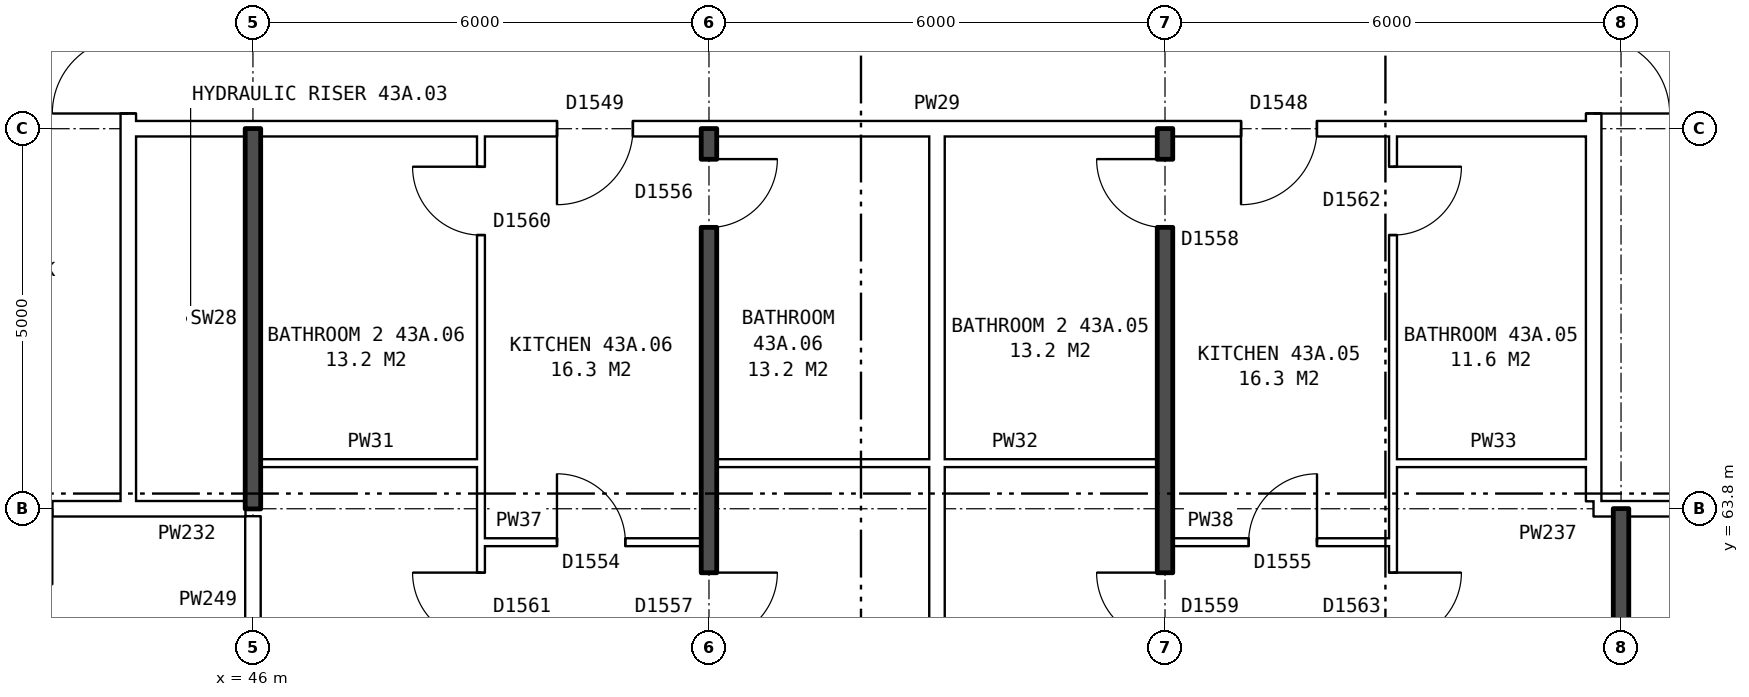
"""IFC4 building model, lengths in metres.
Left out: names, types, materials, properties, quantities, classifications, styles, units other than length and angle.
Written with IfcOpenShell. Run it as: python <this file> out.ifc"""

import sys

from ifc_helpers import new_model, si_unit, direction, frame, frame_2d, origin, place, context, subcontext, project, spatial, rectangle, extrude, element, fill, save


model = new_model("IFC4")
c1 = context("Model", 3, precision=1e-05, world=origin(), true_north=direction((0.0, 1.0)))
c2 = subcontext(c1, "Body", "Model", "MODEL_VIEW")
j1 = project(units=[si_unit("LENGTHUNIT", "METRE"), si_unit("PLANEANGLEUNIT", "RADIAN")], contexts=[c1])
p1 = place(None, origin())
s1 = spatial("IfcSite", under=j1, at=p1, CompositionType="ELEMENT")
p2 = place(p1, origin())
s2 = spatial("IfcBuilding", under=s1, at=p2, CompositionType="ELEMENT")
p3 = place(p2, frame((0.0, 0.0, 154.7)))
s3 = spatial("IfcBuildingStorey", under=s2, at=p3, CompositionType="ELEMENT", Elevation=154.7)
p4 = place(p3, frame((63.64, 63.9, 0.0), z_axis=(0.0, 0.0, 1.0), x_axis=(0.0, 1.0, 0.0)))
e1 = element("IfcWall", 1, at=p4, inside=s3, PredefinedType="PARTITIONING", context=c2, shape_type="SweptSolid", body=[
    extrude(rectangle(XDim=12.2, YDim=0.2, at=frame_2d((6.1, 0.0))), origin(), (0.0, 0.0, 1.0), 2.85),
])
p5 = place(p4, frame((5.1, 0.0, 0.0)))
e2 = element("IfcOpeningElement", 2, at=p5, cuts=e1, PredefinedType="OPENING", context=c2, shape_type="SweptSolid", body=[
    extrude(rectangle(XDim=2.0, YDim=2.1, at=frame_2d((1.0, 1.05))), frame((0.0, 0.11, 0.0), z_axis=(0.0, -1.0, 0.0), x_axis=(1.0, 0.0, 0.0)), (0.0, 0.0, 1.0), 0.22),
])
p6 = place(p3, frame((44.36, 63.9, 0.0), z_axis=(0.0, 0.0, 1.0), x_axis=(0.0, 1.0, 0.0)))
e3 = element("IfcWall", 3, at=p6, inside=s3, PredefinedType="PARTITIONING", context=c2, shape_type="SweptSolid", body=[
    extrude(rectangle(XDim=12.2, YDim=0.2, at=frame_2d((6.1, 0.0))), origin(), (0.0, 0.0, 1.0), 2.85),
])
p7 = place(p6, frame((5.1, 0.0, 0.0)))
e4 = element("IfcOpeningElement", 4, at=p7, cuts=e3, PredefinedType="OPENING", context=c2, shape_type="SweptSolid", body=[
    extrude(rectangle(XDim=2.0, YDim=2.1, at=frame_2d((1.0, 1.05))), frame((0.0, 0.11, 0.0), z_axis=(0.0, -1.0, 0.0), x_axis=(1.0, 0.0, 0.0)), (0.0, 0.0, 1.0), 0.22),
])
p8 = place(p3, frame((49.0, 63.36, 0.0), z_axis=(0.0, 0.0, 1.0), x_axis=(1.0, 0.0, 0.0)))
e5 = element("IfcWall", 5, at=p8, inside=s3, PredefinedType="PARTITIONING", context=c2, shape_type="SweptSolid", body=[
    extrude(rectangle(XDim=2.9, YDim=0.1, at=frame_2d((1.45, 0.0))), origin(), (0.0, 0.0, 1.0), 2.85),
])
p9 = place(p8, frame((1.0, 0.0, 0.0)))
e6 = element("IfcOpeningElement", 6, at=p9, cuts=e5, PredefinedType="OPENING", context=c2, shape_type="SweptSolid", body=[
    extrude(rectangle(XDim=0.9, YDim=2.1, at=frame_2d((0.45, 1.05))), frame((0.0, 0.06, 0.0), z_axis=(0.0, -1.0, 0.0), x_axis=(1.0, 0.0, 0.0)), (0.0, 0.0, 1.0), 0.12),
])
p10 = place(p3, frame((58.1, 63.36, 0.0), z_axis=(0.0, 0.0, 1.0), x_axis=(1.0, 0.0, 0.0)))
e7 = element("IfcWall", 7, at=p10, inside=s3, PredefinedType="PARTITIONING", context=c2, shape_type="SweptSolid", body=[
    extrude(rectangle(XDim=2.9, YDim=0.1, at=frame_2d((1.45, 0.0))), origin(), (0.0, 0.0, 1.0), 2.85),
])
p11 = place(p10, frame((1.0, 0.0, 0.0)))
e8 = element("IfcOpeningElement", 8, at=p11, cuts=e7, PredefinedType="OPENING", context=c2, shape_type="SweptSolid", body=[
    extrude(rectangle(XDim=0.9, YDim=2.1, at=frame_2d((0.45, 1.05))), frame((0.0, 0.06, 0.0), z_axis=(0.0, -1.0, 0.0), x_axis=(1.0, 0.0, 0.0)), (0.0, 0.0, 1.0), 0.12),
])
p12 = place(p3, frame((41.36, 63.8, 0.0), z_axis=(0.0, 0.0, 1.0), x_axis=(1.0, 0.0, 0.0)))
e9 = element("IfcWall", 9, at=p12, inside=s3, PredefinedType="PARTITIONING", context=c2, shape_type="SweptSolid", body=[
    extrude(rectangle(XDim=3.0, YDim=0.2, at=frame_2d((1.5, 0.0))), origin(), (0.0, 0.0, 1.0), 2.85),
])
p13 = place(p12, frame((1.0, 0.0, 0.0)))
e10 = element("IfcOpeningElement", 10, at=p13, cuts=e9, PredefinedType="OPENING", context=c2, shape_type="SweptSolid", body=[
    extrude(rectangle(XDim=1.0, YDim=2.1, at=frame_2d((0.5, 1.05))), frame((0.0, 0.11, 0.0), z_axis=(0.0, -1.0, 0.0), x_axis=(1.0, 0.0, 0.0)), (0.0, 0.0, 1.0), 0.22),
])
p14 = place(p3, frame((44.36, 63.8, 0.0), z_axis=(0.0, 0.0, 1.0), x_axis=(1.0, 0.0, 0.0)))
e11 = element("IfcWall", 11, at=p14, inside=s3, PredefinedType="PARTITIONING", context=c2, shape_type="SweptSolid", body=[
    extrude(rectangle(XDim=1.54, YDim=0.2, at=frame_2d((0.77, 0.0))), origin(), (0.0, 0.0, 1.0), 2.85),
])
p15 = place(p3, frame((63.64, 63.8, 0.0), z_axis=(0.0, 0.0, 1.0), x_axis=(1.0, 0.0, 0.0)))
e12 = element("IfcWall", 12, at=p15, inside=s3, PredefinedType="PARTITIONING", context=c2, shape_type="SweptSolid", body=[
    extrude(rectangle(XDim=3.0, YDim=0.2, at=frame_2d((1.5, 0.0))), origin(), (0.0, 0.0, 1.0), 2.85),
])
p16 = place(p15, frame((1.18, 0.0, 0.0)))
e13 = element("IfcOpeningElement", 13, at=p16, cuts=e12, PredefinedType="OPENING", context=c2, shape_type="SweptSolid", body=[
    extrude(rectangle(XDim=1.0, YDim=2.1, at=frame_2d((0.5, 1.05))), frame((0.0, 0.11, 0.0), z_axis=(0.0, -1.0, 0.0), x_axis=(1.0, 0.0, 0.0)), (0.0, 0.0, 1.0), 0.22),
])
p17 = place(p3, frame((46.1, 64.4, 0.0), z_axis=(0.0, 0.0, 1.0), x_axis=(1.0, 0.0, 0.0)))
e14 = element("IfcWall", 14, at=p17, inside=s3, PredefinedType="PARTITIONING", context=c2, shape_type="SweptSolid", body=[
    extrude(rectangle(XDim=2.9, YDim=0.1, at=frame_2d((1.45, 0.0))), origin(), (0.0, 0.0, 1.0), 2.85),
])
p18 = place(p3, frame((52.1, 64.4, 0.0), z_axis=(0.0, 0.0, 1.0), x_axis=(1.0, 0.0, 0.0)))
e15 = element("IfcWall", 15, at=p18, inside=s3, PredefinedType="PARTITIONING", context=c2, shape_type="SweptSolid", body=[
    extrude(rectangle(XDim=5.8, YDim=0.1, at=frame_2d((2.9, 0.0))), origin(), (0.0, 0.0, 1.0), 2.85),
])
p19 = place(p3, frame((61.0, 64.4, 0.0), z_axis=(0.0, 0.0, 1.0), x_axis=(1.0, 0.0, 0.0)))
e16 = element("IfcWall", 16, at=p19, inside=s3, PredefinedType="PARTITIONING", context=c2, shape_type="SweptSolid", body=[
    extrude(rectangle(XDim=2.64, YDim=0.1, at=frame_2d((1.32, 0.0))), origin(), (0.0, 0.0, 1.0), 2.85),
])
p20 = place(p3, frame((44.36, 68.8, 0.0), z_axis=(0.0, 0.0, 1.0), x_axis=(1.0, 0.0, 0.0)))
e17 = element("IfcWall", 17, at=p20, inside=s3, PredefinedType="PARTITIONING", context=c2, shape_type="SweptSolid", body=[
    extrude(rectangle(XDim=19.28, YDim=0.2, at=frame_2d((9.64, 0.0))), origin(), (0.0, 0.0, 1.0), 2.85),
])
p21 = place(p20, frame((14.64, 0.0, 0.0)))
e18 = element("IfcOpeningElement", 18, at=p21, cuts=e17, PredefinedType="OPENING", context=c2, shape_type="SweptSolid", body=[
    extrude(rectangle(XDim=1.0, YDim=2.1, at=frame_2d((0.5, 1.05))), frame((0.0, 0.11, 0.0), z_axis=(0.0, -1.0, 0.0), x_axis=(1.0, 0.0, 0.0)), (0.0, 0.0, 1.0), 0.22),
])
p22 = place(p20, frame((5.64, 0.0, 0.0)))
e19 = element("IfcOpeningElement", 19, at=p22, cuts=e17, PredefinedType="OPENING", context=c2, shape_type="SweptSolid", body=[
    extrude(rectangle(XDim=1.0, YDim=2.1, at=frame_2d((0.5, 1.05))), frame((0.0, 0.11, 0.0), z_axis=(0.0, -1.0, 0.0), x_axis=(1.0, 0.0, 0.0)), (0.0, 0.0, 1.0), 0.22),
])
p23 = place(p3, frame((46.0, 61.5, 0.0), z_axis=(0.0, 0.0, 1.0), x_axis=(0.0, 1.0, 0.0)))
e20 = element("IfcWall", 20, at=p23, inside=s3, PredefinedType="PARTITIONING", context=c2, shape_type="SweptSolid", body=[
    extrude(rectangle(XDim=2.2, YDim=0.2, at=frame_2d((1.1, 0.0))), origin(), (0.0, 0.0, 1.0), 2.85),
])
p24 = place(p3, frame((46.0, 63.8, 0.0), z_axis=(0.0, 0.0, 1.0), x_axis=(0.0, 1.0, 0.0)))
e21 = element("IfcWall", 21, at=p24, inside=s3, PredefinedType="SOLIDWALL", context=c2, shape_type="SweptSolid", body=[
    extrude(rectangle(XDim=5.0, YDim=0.2, at=frame_2d((2.5, 0.0))), origin(), (0.0, 0.0, 1.0), 2.85),
])
p25 = place(p3, frame((49.0, 54.36, 0.0), z_axis=(0.0, 0.0, 1.0), x_axis=(0.0, 1.0, 0.0)))
e22 = element("IfcWall", 22, at=p25, inside=s3, PredefinedType="PARTITIONING", context=c2, shape_type="SweptSolid", body=[
    extrude(rectangle(XDim=14.34, YDim=0.1, at=frame_2d((7.17, 0.0))), origin(), (0.0, 0.0, 1.0), 2.85),
])
p26 = place(p25, frame((7.7, 0.0, 0.0)))
e23 = element("IfcOpeningElement", 23, at=p26, cuts=e22, PredefinedType="OPENING", context=c2, shape_type="SweptSolid", body=[
    extrude(rectangle(XDim=0.9, YDim=2.1, at=frame_2d((0.45, 1.05))), frame((0.0, 0.06, 0.0), z_axis=(0.0, -1.0, 0.0), x_axis=(1.0, 0.0, 0.0)), (0.0, 0.0, 1.0), 0.12),
])
p27 = place(p25, frame((13.04, 0.0, 0.0)))
e24 = element("IfcOpeningElement", 24, at=p27, cuts=e22, PredefinedType="OPENING", context=c2, shape_type="SweptSolid", body=[
    extrude(rectangle(XDim=0.9, YDim=2.1, at=frame_2d((0.45, 1.05))), frame((0.0, 0.06, 0.0), z_axis=(0.0, -1.0, 0.0), x_axis=(1.0, 0.0, 0.0)), (0.0, 0.0, 1.0), 0.12),
])
p28 = place(p3, frame((52.0, 54.36, 0.0), z_axis=(0.0, 0.0, 1.0), x_axis=(0.0, 1.0, 0.0)))
e25 = element("IfcWall", 25, at=p28, inside=s3, PredefinedType="SOLIDWALL", context=c2, shape_type="SweptSolid", body=[
    extrude(rectangle(XDim=14.44, YDim=0.2, at=frame_2d((7.22, 0.0))), origin(), (0.0, 0.0, 1.0), 2.85),
])
p29 = place(p28, frame((7.7, 0.0, 0.0)))
e26 = element("IfcOpeningElement", 26, at=p29, cuts=e25, PredefinedType="OPENING", context=c2, shape_type="SweptSolid", body=[
    extrude(rectangle(XDim=0.9, YDim=2.1, at=frame_2d((0.45, 1.05))), frame((0.0, 0.11, 0.0), z_axis=(0.0, -1.0, 0.0), x_axis=(1.0, 0.0, 0.0)), (0.0, 0.0, 1.0), 0.22),
])
p30 = place(p28, frame((13.14, 0.0, 0.0)))
e27 = element("IfcOpeningElement", 27, at=p30, cuts=e25, PredefinedType="OPENING", context=c2, shape_type="SweptSolid", body=[
    extrude(rectangle(XDim=0.9, YDim=2.1, at=frame_2d((0.45, 1.05))), frame((0.0, 0.11, 0.0), z_axis=(0.0, -1.0, 0.0), x_axis=(1.0, 0.0, 0.0)), (0.0, 0.0, 1.0), 0.22),
])
p31 = place(p3, frame((55.0, 54.36, 0.0), z_axis=(0.0, 0.0, 1.0), x_axis=(0.0, 1.0, 0.0)))
e28 = element("IfcWall", 28, at=p31, inside=s3, PredefinedType="PARTITIONING", context=c2, shape_type="SweptSolid", body=[
    extrude(rectangle(XDim=14.34, YDim=0.2, at=frame_2d((7.17, 0.0))), origin(), (0.0, 0.0, 1.0), 2.85),
])
p32 = place(p3, frame((58.0, 54.36, 0.0), z_axis=(0.0, 0.0, 1.0), x_axis=(0.0, 1.0, 0.0)))
e29 = element("IfcWall", 29, at=p32, inside=s3, PredefinedType="SOLIDWALL", context=c2, shape_type="SweptSolid", body=[
    extrude(rectangle(XDim=14.44, YDim=0.2, at=frame_2d((7.22, 0.0))), origin(), (0.0, 0.0, 1.0), 2.85),
])
p33 = place(p32, frame((7.7, 0.0, 0.0)))
e30 = element("IfcOpeningElement", 30, at=p33, cuts=e29, PredefinedType="OPENING", context=c2, shape_type="SweptSolid", body=[
    extrude(rectangle(XDim=0.9, YDim=2.1, at=frame_2d((0.45, 1.05))), frame((0.0, 0.11, 0.0), z_axis=(0.0, -1.0, 0.0), x_axis=(1.0, 0.0, 0.0)), (0.0, 0.0, 1.0), 0.22),
])
p34 = place(p32, frame((13.14, 0.0, 0.0)))
e31 = element("IfcOpeningElement", 31, at=p34, cuts=e29, PredefinedType="OPENING", context=c2, shape_type="SweptSolid", body=[
    extrude(rectangle(XDim=0.9, YDim=2.1, at=frame_2d((0.45, 1.05))), frame((0.0, 0.11, 0.0), z_axis=(0.0, -1.0, 0.0), x_axis=(1.0, 0.0, 0.0)), (0.0, 0.0, 1.0), 0.22),
])
p35 = place(p3, frame((61.0, 54.36, 0.0), z_axis=(0.0, 0.0, 1.0), x_axis=(0.0, 1.0, 0.0)))
e32 = element("IfcWall", 32, at=p35, inside=s3, PredefinedType="PARTITIONING", context=c2, shape_type="SweptSolid", body=[
    extrude(rectangle(XDim=14.34, YDim=0.1, at=frame_2d((7.17, 0.0))), origin(), (0.0, 0.0, 1.0), 2.85),
])
p36 = place(p35, frame((7.7, 0.0, 0.0)))
e33 = element("IfcOpeningElement", 33, at=p36, cuts=e32, PredefinedType="OPENING", context=c2, shape_type="SweptSolid", body=[
    extrude(rectangle(XDim=0.9, YDim=2.1, at=frame_2d((0.45, 1.05))), frame((0.0, 0.06, 0.0), z_axis=(0.0, -1.0, 0.0), x_axis=(1.0, 0.0, 0.0)), (0.0, 0.0, 1.0), 0.12),
])
p37 = place(p35, frame((13.04, 0.0, 0.0)))
e34 = element("IfcOpeningElement", 34, at=p37, cuts=e32, PredefinedType="OPENING", context=c2, shape_type="SweptSolid", body=[
    extrude(rectangle(XDim=0.9, YDim=2.1, at=frame_2d((0.45, 1.05))), frame((0.0, 0.06, 0.0), z_axis=(0.0, -1.0, 0.0), x_axis=(1.0, 0.0, 0.0)), (0.0, 0.0, 1.0), 0.12),
])
p38 = place(p3, frame((64.0, 54.36, 0.0), z_axis=(0.0, 0.0, 1.0), x_axis=(0.0, 1.0, 0.0)))
e35 = element("IfcWall", 35, at=p38, inside=s3, PredefinedType="SOLIDWALL", context=c2, shape_type="SweptSolid", body=[
    extrude(rectangle(XDim=9.44, YDim=0.2, at=frame_2d((4.72, 0.0))), origin(), (0.0, 0.0, 1.0), 2.85),
])
p39 = place(p5, frame((2.0, 0.0, 0.0), z_axis=(0.0, 0.0, 1.0), x_axis=(-1.0, 0.0, 0.0)))
e36 = element("IfcDoor", 36, at=p39, inside=s3, OperationType="DOUBLE_DOOR_SINGLE_SWING", PredefinedType="DOOR", context=c2, shape_type="SweptSolid", body=[
    extrude(rectangle(XDim=2.0, YDim=2.1, at=frame_2d((1.0, 1.05))), frame((0.0, 0.025, 0.0), z_axis=(0.0, -1.0, 0.0), x_axis=(1.0, 0.0, 0.0)), (0.0, 0.0, 1.0), 0.05),
])
fill(e2, e36)
p40 = place(p7, origin())
e37 = element("IfcDoor", 37, at=p40, inside=s3, OperationType="DOUBLE_DOOR_SINGLE_SWING", PredefinedType="DOOR", context=c2, shape_type="SweptSolid", body=[
    extrude(rectangle(XDim=2.0, YDim=2.1, at=frame_2d((1.0, 1.05))), frame((0.0, 0.025, 0.0), z_axis=(0.0, -1.0, 0.0), x_axis=(1.0, 0.0, 0.0)), (0.0, 0.0, 1.0), 0.05),
])
fill(e4, e37)
p41 = place(p36, frame((0.9, 0.0, 0.0), z_axis=(0.0, 0.0, 1.0), x_axis=(-1.0, 0.0, 0.0)))
e38 = element("IfcDoor", 38, at=p41, inside=s3, OperationType="SINGLE_SWING_LEFT", PredefinedType="DOOR", context=c2, shape_type="SweptSolid", body=[
    extrude(rectangle(XDim=0.9, YDim=2.1, at=frame_2d((0.45, 1.05))), frame((0.0, 0.025, 0.0), z_axis=(0.0, -1.0, 0.0), x_axis=(1.0, 0.0, 0.0)), (0.0, 0.0, 1.0), 0.05),
])
fill(e33, e38)
p42 = place(p33, origin())
e39 = element("IfcDoor", 39, at=p42, inside=s3, OperationType="SINGLE_SWING_RIGHT", PredefinedType="DOOR", context=c2, shape_type="SweptSolid", body=[
    extrude(rectangle(XDim=0.9, YDim=2.1, at=frame_2d((0.45, 1.05))), frame((0.0, 0.025, 0.0), z_axis=(0.0, -1.0, 0.0), x_axis=(1.0, 0.0, 0.0)), (0.0, 0.0, 1.0), 0.05),
])
fill(e30, e39)
p43 = place(p21, frame((1.0, 0.0, 0.0), z_axis=(0.0, 0.0, 1.0), x_axis=(-1.0, 0.0, 0.0)))
e40 = element("IfcDoor", 40, at=p43, inside=s3, OperationType="SINGLE_SWING_RIGHT", PredefinedType="DOOR", context=c2, shape_type="SweptSolid", body=[
    extrude(rectangle(XDim=1.0, YDim=2.1, at=frame_2d((0.5, 1.05))), frame((0.0, 0.025, 0.0), z_axis=(0.0, -1.0, 0.0), x_axis=(1.0, 0.0, 0.0)), (0.0, 0.0, 1.0), 0.05),
])
fill(e18, e40)
p44 = place(p11, origin())
e41 = element("IfcDoor", 41, at=p44, inside=s3, OperationType="SINGLE_SWING_RIGHT", PredefinedType="DOOR", context=c2, shape_type="SweptSolid", body=[
    extrude(rectangle(XDim=0.9, YDim=2.1, at=frame_2d((0.45, 1.05))), frame((0.0, 0.025, 0.0), z_axis=(0.0, -1.0, 0.0), x_axis=(1.0, 0.0, 0.0)), (0.0, 0.0, 1.0), 0.05),
])
fill(e8, e41)
p45 = place(p37, frame((0.9, 0.0, 0.0), z_axis=(0.0, 0.0, 1.0), x_axis=(-1.0, 0.0, 0.0)))
e42 = element("IfcDoor", 42, at=p45, inside=s3, OperationType="SINGLE_SWING_LEFT", PredefinedType="DOOR", context=c2, shape_type="SweptSolid", body=[
    extrude(rectangle(XDim=0.9, YDim=2.1, at=frame_2d((0.45, 1.05))), frame((0.0, 0.025, 0.0), z_axis=(0.0, -1.0, 0.0), x_axis=(1.0, 0.0, 0.0)), (0.0, 0.0, 1.0), 0.05),
])
fill(e34, e42)
p46 = place(p34, origin())
e43 = element("IfcDoor", 43, at=p46, inside=s3, OperationType="SINGLE_SWING_RIGHT", PredefinedType="DOOR", context=c2, shape_type="SweptSolid", body=[
    extrude(rectangle(XDim=0.9, YDim=2.1, at=frame_2d((0.45, 1.05))), frame((0.0, 0.025, 0.0), z_axis=(0.0, -1.0, 0.0), x_axis=(1.0, 0.0, 0.0)), (0.0, 0.0, 1.0), 0.05),
])
fill(e31, e43)
p47 = place(p29, frame((0.9, 0.0, 0.0), z_axis=(0.0, 0.0, 1.0), x_axis=(-1.0, 0.0, 0.0)))
e44 = element("IfcDoor", 44, at=p47, inside=s3, OperationType="SINGLE_SWING_LEFT", PredefinedType="DOOR", context=c2, shape_type="SweptSolid", body=[
    extrude(rectangle(XDim=0.9, YDim=2.1, at=frame_2d((0.45, 1.05))), frame((0.0, 0.025, 0.0), z_axis=(0.0, -1.0, 0.0), x_axis=(1.0, 0.0, 0.0)), (0.0, 0.0, 1.0), 0.05),
])
fill(e26, e44)
p48 = place(p26, origin())
e45 = element("IfcDoor", 45, at=p48, inside=s3, OperationType="SINGLE_SWING_RIGHT", PredefinedType="DOOR", context=c2, shape_type="SweptSolid", body=[
    extrude(rectangle(XDim=0.9, YDim=2.1, at=frame_2d((0.45, 1.05))), frame((0.0, 0.025, 0.0), z_axis=(0.0, -1.0, 0.0), x_axis=(1.0, 0.0, 0.0)), (0.0, 0.0, 1.0), 0.05),
])
fill(e23, e45)
p49 = place(p22, frame((1.0, 0.0, 0.0), z_axis=(0.0, 0.0, 1.0), x_axis=(-1.0, 0.0, 0.0)))
e46 = element("IfcDoor", 46, at=p49, inside=s3, OperationType="SINGLE_SWING_RIGHT", PredefinedType="DOOR", context=c2, shape_type="SweptSolid", body=[
    extrude(rectangle(XDim=1.0, YDim=2.1, at=frame_2d((0.5, 1.05))), frame((0.0, 0.025, 0.0), z_axis=(0.0, -1.0, 0.0), x_axis=(1.0, 0.0, 0.0)), (0.0, 0.0, 1.0), 0.05),
])
fill(e19, e46)
p50 = place(p9, origin())
e47 = element("IfcDoor", 47, at=p50, inside=s3, OperationType="SINGLE_SWING_LEFT", PredefinedType="DOOR", context=c2, shape_type="SweptSolid", body=[
    extrude(rectangle(XDim=0.9, YDim=2.1, at=frame_2d((0.45, 1.05))), frame((0.0, 0.025, 0.0), z_axis=(0.0, -1.0, 0.0), x_axis=(1.0, 0.0, 0.0)), (0.0, 0.0, 1.0), 0.05),
])
fill(e6, e47)
p51 = place(p30, frame((0.9, 0.0, 0.0), z_axis=(0.0, 0.0, 1.0), x_axis=(-1.0, 0.0, 0.0)))
e48 = element("IfcDoor", 48, at=p51, inside=s3, OperationType="SINGLE_SWING_LEFT", PredefinedType="DOOR", context=c2, shape_type="SweptSolid", body=[
    extrude(rectangle(XDim=0.9, YDim=2.1, at=frame_2d((0.45, 1.05))), frame((0.0, 0.025, 0.0), z_axis=(0.0, -1.0, 0.0), x_axis=(1.0, 0.0, 0.0)), (0.0, 0.0, 1.0), 0.05),
])
fill(e27, e48)
p52 = place(p27, origin())
e49 = element("IfcDoor", 49, at=p52, inside=s3, OperationType="SINGLE_SWING_RIGHT", PredefinedType="DOOR", context=c2, shape_type="SweptSolid", body=[
    extrude(rectangle(XDim=0.9, YDim=2.1, at=frame_2d((0.45, 1.05))), frame((0.0, 0.025, 0.0), z_axis=(0.0, -1.0, 0.0), x_axis=(1.0, 0.0, 0.0)), (0.0, 0.0, 1.0), 0.05),
])
fill(e24, e49)
save(model, sys.argv[1])
